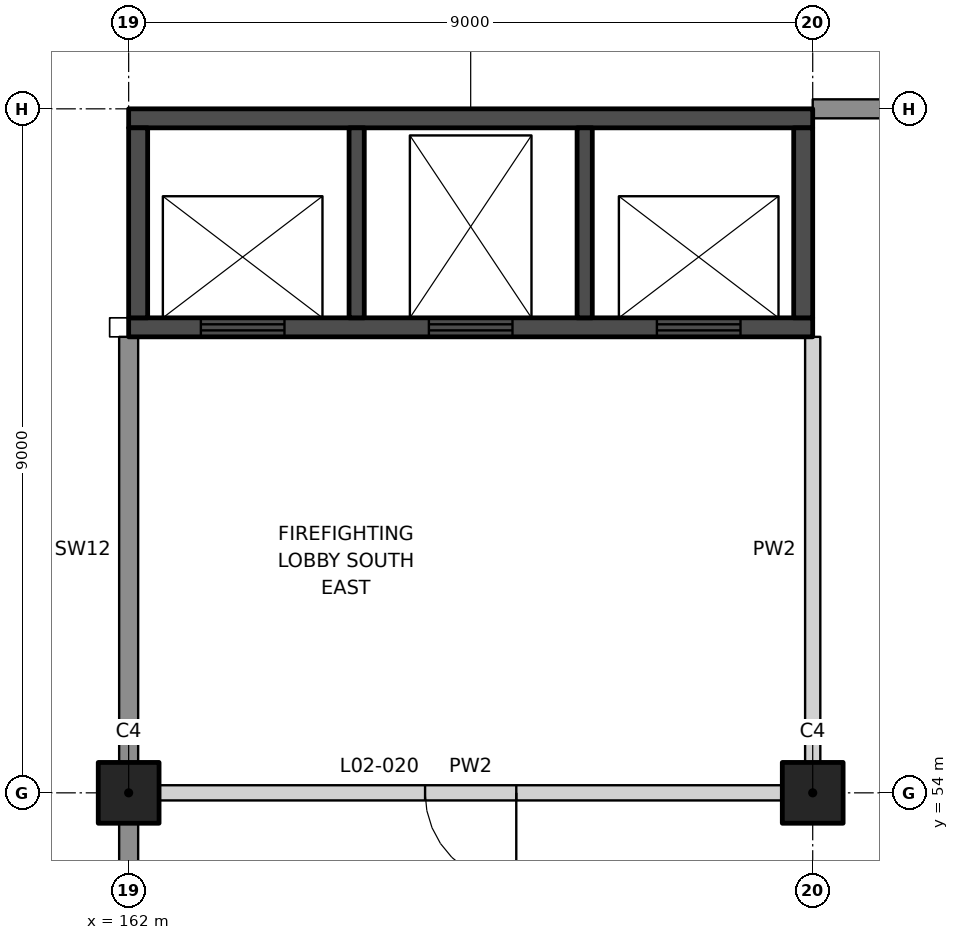
"""IFC4 building model, lengths in metres.
Left out: names, types, materials, properties, quantities, classifications, styles, units other than length and angle.
Written with IfcOpenShell. Run it as: python <this file> out.ifc"""

import sys

from ifc_helpers import new_model, si_unit, direction, frame, frame_2d, origin, origin_2d, place, context, subcontext, project, spatial, rectangle, extrude, element, fill, save


model = new_model("IFC4")
c1 = context("Model", 3, precision=1e-05, world=origin(), true_north=direction((0.0, 1.0)))
c2 = subcontext(c1, "Body", "Model", "MODEL_VIEW")
j1 = project(units=[si_unit("LENGTHUNIT", "METRE"), si_unit("PLANEANGLEUNIT", "RADIAN")], contexts=[c1])
p1 = place(None, origin())
s1 = spatial("IfcSite", under=j1, at=p1, CompositionType="ELEMENT")
p2 = place(p1, origin())
s2 = spatial("IfcBuilding", under=s1, at=p2, CompositionType="ELEMENT")
p3 = place(p2, frame((0.0, 0.0, 11.5)))
s3 = spatial("IfcBuildingStorey", under=s2, at=p3, CompositionType="ELEMENT", Elevation=11.5)
for number, where, z_axis, x_axis in (
    (1, (162.0, 54.0, 0.0), (0.0, 0.0, 1.0), (1.0, 0.0, 0.0)),
    (2, (171.0, 54.0, 0.0), (0.0, 0.0, 1.0), (1.0, 0.0, 0.0)),
):
    element("IfcColumn", number, at=place(p3, frame(where, z_axis=z_axis, x_axis=x_axis)), inside=s3, PredefinedType="COLUMN", context=c2, shape_type="SweptSolid", body=[
        extrude(rectangle(XDim=0.8, YDim=0.8, at=origin_2d()), origin(), (0.0, 0.0, 1.0), 10.5),
    ])
p4 = place(p3, frame((162.4, 54.0, 0.0), z_axis=(0.0, 0.0, 1.0), x_axis=(1.0, 0.0, 0.0)))
e3 = element("IfcWall", 3, at=p4, inside=s3, PredefinedType="PARTITIONING", context=c2, shape_type="SweptSolid", body=[
    extrude(rectangle(XDim=8.2, YDim=0.2, at=frame_2d((4.1, 0.0))), origin(), (0.0, 0.0, 1.0), 9.25),
])
p5 = place(p4, frame((3.5, 0.0, 0.0)))
e4 = element("IfcOpeningElement", 4, at=p5, cuts=e3, PredefinedType="OPENING", context=c2, shape_type="SweptSolid", body=[
    extrude(rectangle(XDim=1.2, YDim=2.1, at=frame_2d((0.6, 1.05))), frame((0.0, 0.11, 0.0), z_axis=(0.0, -1.0, 0.0), x_axis=(1.0, 0.0, 0.0)), (0.0, 0.0, 1.0), 0.22),
])
p6 = place(p3, frame((171.0, 54.4, 0.0), z_axis=(0.0, 0.0, 1.0), x_axis=(0.0, 1.0, 0.0)))
e5 = element("IfcWall", 5, at=p6, inside=s3, PredefinedType="PARTITIONING", context=c2, shape_type="SweptSolid", body=[
    extrude(rectangle(XDim=5.6, YDim=0.2, at=frame_2d((2.8, 0.0))), origin(), (0.0, 0.0, 1.0), 9.45),
])
p7 = place(p3, frame((162.0, 60.125, 0.0), z_axis=(0.0, 0.0, 1.0), x_axis=(1.0, 0.0, 0.0)))
e6 = element("IfcWall", 6, at=p7, inside=s3, PredefinedType="SHEAR", context=c2, shape_type="SweptSolid", body=[
    extrude(rectangle(XDim=9.0, YDim=0.25, at=frame_2d((4.5, 0.0))), origin(), (0.0, 0.0, 1.0), 10.5),
])
p8 = place(p7, frame((0.95, 0.0, 0.0)))
e7 = element("IfcOpeningElement", 7, at=p8, cuts=e6, PredefinedType="OPENING", context=c2, shape_type="SweptSolid", body=[
    extrude(rectangle(XDim=1.1, YDim=2.1, at=frame_2d((0.55, 1.05))), frame((0.0, 0.135, 0.0), z_axis=(0.0, -1.0, 0.0), x_axis=(1.0, 0.0, 0.0)), (0.0, 0.0, 1.0), 0.27),
])
p9 = place(p7, frame((3.95, 0.0, 0.0)))
e8 = element("IfcOpeningElement", 8, at=p9, cuts=e6, PredefinedType="OPENING", context=c2, shape_type="SweptSolid", body=[
    extrude(rectangle(XDim=1.1, YDim=2.1, at=frame_2d((0.55, 1.05))), frame((0.0, 0.135, 0.0), z_axis=(0.0, -1.0, 0.0), x_axis=(1.0, 0.0, 0.0)), (0.0, 0.0, 1.0), 0.27),
])
p10 = place(p7, frame((6.95, 0.0, 0.0)))
e9 = element("IfcOpeningElement", 9, at=p10, cuts=e6, PredefinedType="OPENING", context=c2, shape_type="SweptSolid", body=[
    extrude(rectangle(XDim=1.1, YDim=2.1, at=frame_2d((0.55, 1.05))), frame((0.0, 0.135, 0.0), z_axis=(0.0, -1.0, 0.0), x_axis=(1.0, 0.0, 0.0)), (0.0, 0.0, 1.0), 0.27),
])
p11 = place(p3, frame((162.0, 62.875, 0.0), z_axis=(0.0, 0.0, 1.0), x_axis=(1.0, 0.0, 0.0)))
e10 = element("IfcWall", 10, at=p11, inside=s3, PredefinedType="SHEAR", context=c2, shape_type="SweptSolid", body=[
    extrude(rectangle(XDim=9.0, YDim=0.25, at=frame_2d((4.5, 0.0))), origin(), (0.0, 0.0, 1.0), 10.5),
])
for number, where, z_axis, x_axis in (
    (11, (162.125, 60.25, 0.0), (0.0, 0.0, 1.0), (0.0, 1.0, 0.0)),
    (12, (170.875, 60.25, 0.0), (0.0, 0.0, 1.0), (0.0, 1.0, 0.0)),
):
    element("IfcWall", number, at=place(p3, frame(where, z_axis=z_axis, x_axis=x_axis)), inside=s3, PredefinedType="SHEAR", context=c2, shape_type="SweptSolid", body=[
        extrude(rectangle(XDim=2.5, YDim=0.25, at=frame_2d((1.25, 0.0))), origin(), (0.0, 0.0, 1.0), 10.5),
    ])
for number, where, z_axis, x_axis in (
    (13, (165.0, 60.25, 0.0), (0.0, 0.0, 1.0), (0.0, 1.0, 0.0)),
    (14, (168.0, 60.25, 0.0), (0.0, 0.0, 1.0), (0.0, 1.0, 0.0)),
):
    element("IfcWall", number, at=place(p3, frame(where, z_axis=z_axis, x_axis=x_axis)), inside=s3, PredefinedType="SHEAR", context=c2, shape_type="SweptSolid", body=[
        extrude(rectangle(XDim=2.5, YDim=0.2, at=frame_2d((1.25, 0.0))), origin(), (0.0, 0.0, 1.0), 10.5),
    ])
p12 = place(p3, frame((162.0, 50.5, 0.0), z_axis=(0.0, 0.0, 1.0), x_axis=(0.0, 1.0, 0.0)))
e15 = element("IfcWall", 15, at=p12, inside=s3, PredefinedType="SOLIDWALL", context=c2, shape_type="SweptSolid", body=[
    extrude(rectangle(XDim=3.1, YDim=0.25, at=frame_2d((1.55, 0.0))), origin(), (0.0, 0.0, 1.0), 9.25),
])
p13 = place(p3, frame((162.0, 54.4, 0.0), z_axis=(0.0, 0.0, 1.0), x_axis=(0.0, 1.0, 0.0)))
e16 = element("IfcWall", 16, at=p13, inside=s3, PredefinedType="SOLIDWALL", context=c2, shape_type="SweptSolid", body=[
    extrude(rectangle(XDim=5.6, YDim=0.25, at=frame_2d((2.8, 0.0))), origin(), (0.0, 0.0, 1.0), 9.45),
])
p14 = place(p3, frame((171.0, 63.0, 0.0), z_axis=(0.0, 0.0, 1.0), x_axis=(1.0, 0.0, 0.0)))
e17 = element("IfcWall", 17, at=p14, inside=s3, PredefinedType="SOLIDWALL", context=c2, shape_type="SweptSolid", body=[
    extrude(rectangle(XDim=3.5, YDim=0.25, at=frame_2d((1.75, 0.0))), origin(), (0.0, 0.0, 1.0), 9.15),
])
p15 = place(p5, frame((1.2, 0.0, 0.0), z_axis=(0.0, 0.0, 1.0), x_axis=(-1.0, 0.0, 0.0)))
e18 = element("IfcDoor", 18, at=p15, inside=s3, OperationType="SINGLE_SWING_LEFT", PredefinedType="DOOR", context=c2, shape_type="SweptSolid", body=[
    extrude(rectangle(XDim=1.2, YDim=2.1, at=frame_2d((0.6, 1.05))), frame((0.0, 0.025, 0.0), z_axis=(0.0, -1.0, 0.0), x_axis=(1.0, 0.0, 0.0)), (0.0, 0.0, 1.0), 0.05),
])
fill(e4, e18)
p16 = place(p8, origin())
e19 = element("IfcDoor", 19, at=p16, inside=s3, OperationType="DOUBLE_DOOR_SLIDING", PredefinedType="DOOR", context=c2, shape_type="SweptSolid", body=[
    extrude(rectangle(XDim=1.1, YDim=2.1, at=frame_2d((0.55, 1.05))), frame((0.0, 0.025, 0.0), z_axis=(0.0, -1.0, 0.0), x_axis=(1.0, 0.0, 0.0)), (0.0, 0.0, 1.0), 0.05),
])
fill(e7, e19)
p17 = place(p9, origin())
e20 = element("IfcDoor", 20, at=p17, inside=s3, OperationType="DOUBLE_DOOR_SLIDING", PredefinedType="DOOR", context=c2, shape_type="SweptSolid", body=[
    extrude(rectangle(XDim=1.1, YDim=2.1, at=frame_2d((0.55, 1.05))), frame((0.0, 0.025, 0.0), z_axis=(0.0, -1.0, 0.0), x_axis=(1.0, 0.0, 0.0)), (0.0, 0.0, 1.0), 0.05),
])
fill(e8, e20)
p18 = place(p10, origin())
e21 = element("IfcDoor", 21, at=p18, inside=s3, OperationType="DOUBLE_DOOR_SLIDING", PredefinedType="DOOR", context=c2, shape_type="SweptSolid", body=[
    extrude(rectangle(XDim=1.1, YDim=2.1, at=frame_2d((0.55, 1.05))), frame((0.0, 0.025, 0.0), z_axis=(0.0, -1.0, 0.0), x_axis=(1.0, 0.0, 0.0)), (0.0, 0.0, 1.0), 0.05),
])
fill(e9, e21)
save(model, sys.argv[1])
